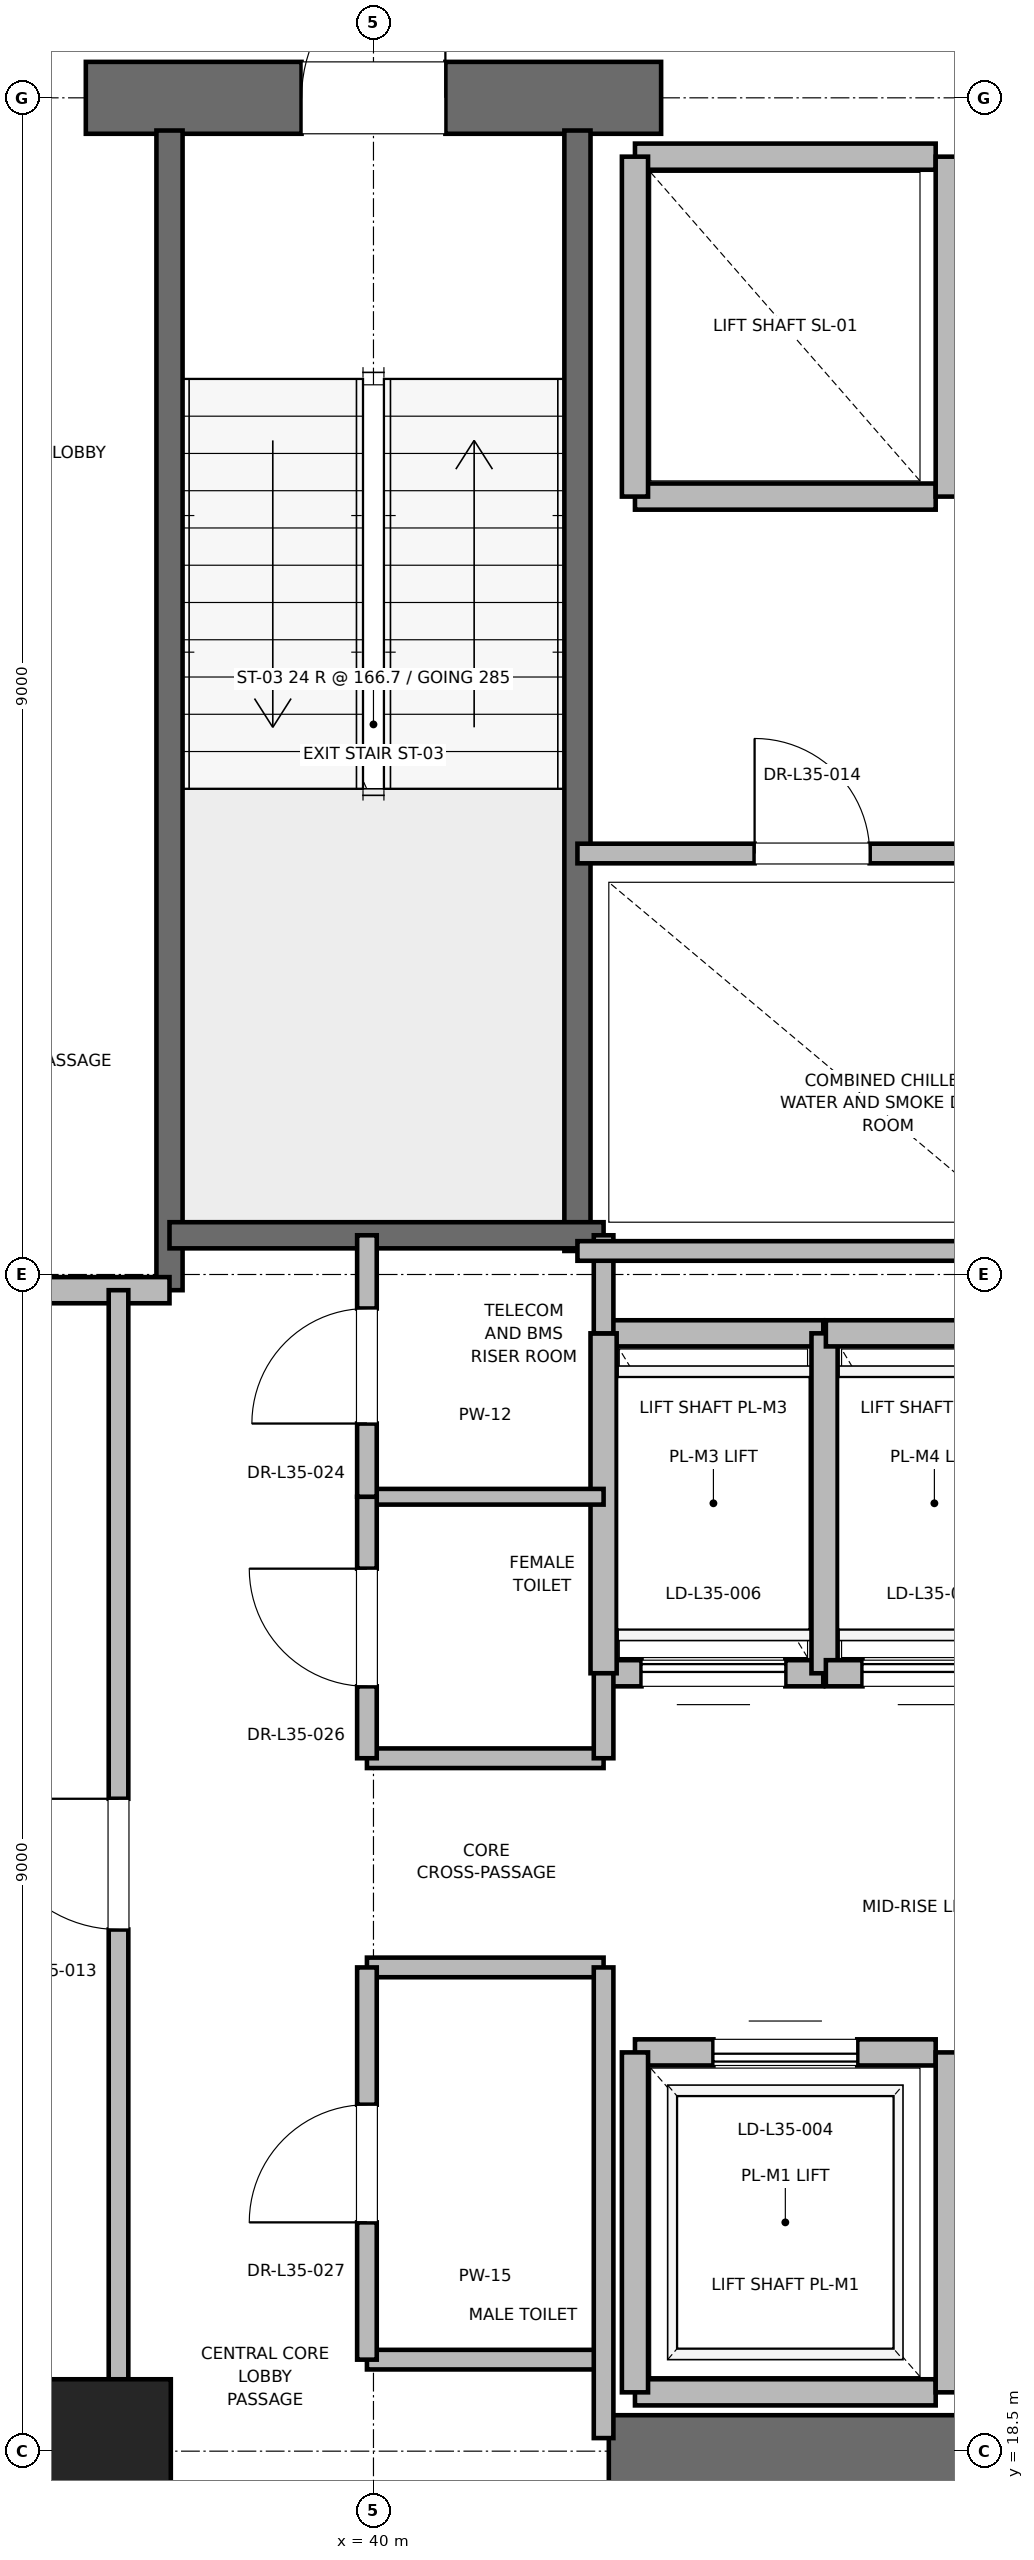
"""IFC4 building model, lengths in metres.
Left out: names, types, materials, properties, quantities, classifications, styles, units other than length and angle.
Written with IfcOpenShell. Run it as: python <this file> out.ifc"""

import sys

from ifc_helpers import new_model, si_unit, direction, frame, frame_2d, origin, origin_2d, place, context, subcontext, project, spatial, rectangle, extrude, element, fill, save


model = new_model("IFC4")
c1 = context("Model", 3, precision=1e-05, world=origin(), true_north=direction((0.0, 1.0)))
c2 = subcontext(c1, "Body", "Model", "MODEL_VIEW")
j1 = project(units=[si_unit("LENGTHUNIT", "METRE"), si_unit("PLANEANGLEUNIT", "RADIAN")], contexts=[c1])
p1 = place(None, origin())
s1 = spatial("IfcSite", under=j1, at=p1, CompositionType="ELEMENT")
p2 = place(p1, origin())
s2 = spatial("IfcBuilding", under=s1, at=p2, CompositionType="ELEMENT")
p3 = place(p2, frame((0.0, 0.0, 152.4)))
s3 = spatial("IfcBuildingStorey", under=s2, at=p3, CompositionType="ELEMENT", Elevation=152.4)
p4 = place(p3, frame((37.9, 18.5, 0.0), z_axis=(0.0, 0.0, 1.0), x_axis=(1.0, 0.0, 0.0)))
e1 = element("IfcColumn", 1, at=p4, inside=s3, PredefinedType="PILASTER", context=c2, shape_type="SweptSolid", body=[
    extrude(rectangle(XDim=1.1, YDim=1.1, at=origin_2d()), origin(), (0.0, 0.0, 1.0), 4.0),
])
for number, where, z_axis, x_axis in (
    (2, (29.0, 18.5, 0.0), (0.0, 0.0, 1.0), (1.0, 0.0, 0.0)),
    (3, (41.8, 18.5, 0.0), (0.0, 0.0, 1.0), (1.0, 0.0, 0.0)),
):
    element("IfcWall", number, at=place(p3, frame(where, z_axis=z_axis, x_axis=x_axis)), inside=s3, PredefinedType="SHEAR", context=c2, shape_type="SweptSolid", body=[
        extrude(rectangle(XDim=9.2, YDim=0.55, at=frame_2d((4.6, 0.0))), origin(), (0.0, 0.0, 1.0), 3.775),
    ])
p5 = place(p3, frame((37.8, 36.5, 0.0), z_axis=(0.0, 0.0, 1.0), x_axis=(1.0, 0.0, 0.0)))
e4 = element("IfcWall", 4, at=p5, inside=s3, PredefinedType="SHEAR", context=c2, shape_type="SweptSolid", body=[
    extrude(rectangle(XDim=4.4, YDim=0.55, at=frame_2d((2.2, 0.0))), origin(), (0.0, 0.0, 1.0), 3.775),
])
p6 = place(p5, frame((1.65, 0.0, 0.0)))
e5 = element("IfcOpeningElement", 5, at=p6, cuts=e4, PredefinedType="OPENING", context=c2, shape_type="SweptSolid", body=[
    extrude(rectangle(XDim=1.1, YDim=2.15, at=frame_2d((0.55, 1.075))), frame((0.0, 0.275, 0.0), z_axis=(0.0, -1.0, 0.0), x_axis=(1.0, 0.0, 0.0)), (0.0, 0.0, 1.0), 0.55),
])
p7 = place(p3, frame((38.44, 27.38, 0.0), z_axis=(0.0, 0.0, 1.0), x_axis=(0.0, 1.0, 0.0)))
e6 = element("IfcWall", 6, at=p7, inside=s3, PredefinedType="SOLIDWALL", context=c2, shape_type="SweptSolid", body=[
    extrude(rectangle(XDim=8.87, YDim=0.2, at=frame_2d((4.435, 0.0))), origin(), (0.0, 0.0, 1.0), 3.775),
])
p8 = place(p3, frame((41.56, 27.68, 0.0), z_axis=(0.0, 0.0, 1.0), x_axis=(0.0, 1.0, 0.0)))
e7 = element("IfcWall", 7, at=p8, inside=s3, PredefinedType="SOLIDWALL", context=c2, shape_type="SweptSolid", body=[
    extrude(rectangle(XDim=8.57, YDim=0.2, at=frame_2d((4.285, 0.0))), origin(), (0.0, 0.0, 1.0), 3.775),
])
p9 = place(p3, frame((38.44, 27.8, 0.0), z_axis=(0.0, 0.0, 1.0), x_axis=(1.0, 0.0, 0.0)))
e8 = element("IfcWall", 8, at=p9, inside=s3, PredefinedType="SOLIDWALL", context=c2, shape_type="SweptSolid", body=[
    extrude(rectangle(XDim=3.32, YDim=0.2, at=frame_2d((1.66, 0.0))), origin(), (0.0, 0.0, 1.0), 3.775),
])
p10 = place(p3, frame((32.82, 27.38, 0.0), z_axis=(0.0, 0.0, 1.0), x_axis=(1.0, 0.0, 0.0)))
e9 = element("IfcWall", 9, at=p10, inside=s3, PredefinedType="PARTITIONING", context=c2, shape_type="SweptSolid", body=[
    extrude(rectangle(XDim=5.62, YDim=0.2, at=frame_2d((2.81, 0.0))), origin(), (0.0, 0.0, 1.0), 3.775),
])
p11 = place(p3, frame((42.0, 18.95, 0.0), z_axis=(0.0, 0.0, 1.0), x_axis=(1.0, 0.0, 0.0)))
e10 = element("IfcWall", 10, at=p11, inside=s3, PredefinedType="SOLIDWALL", context=c2, shape_type="SweptSolid", body=[
    extrude(rectangle(XDim=2.3, YDim=0.2, at=frame_2d((1.15, 0.0))), origin(), (0.0, 0.0, 1.0), 2.755),
])
p12 = place(p3, frame((44.3, 21.55, 0.0), z_axis=(0.0, 0.0, 1.0), x_axis=(-1.0, 0.0, 0.0)))
e11 = element("IfcWall", 11, at=p12, inside=s3, PredefinedType="SOLIDWALL", context=c2, shape_type="SweptSolid", body=[
    extrude(rectangle(XDim=2.3, YDim=0.2, at=frame_2d((1.15, 0.0))), origin(), (0.0, 0.0, 1.0), 3.775),
])
p13 = place(p12, frame((0.6, 0.0, 0.0)))
e12 = element("IfcOpeningElement", 12, at=p13, cuts=e11, PredefinedType="OPENING", context=c2, shape_type="SweptSolid", body=[
    extrude(rectangle(XDim=1.1, YDim=2.2, at=frame_2d((0.55, 1.1))), frame((0.0, 0.1, 0.0), z_axis=(0.0, -1.0, 0.0), x_axis=(1.0, 0.0, 0.0)), (0.0, 0.0, 1.0), 0.2),
])
p14 = place(p3, frame((42.0, 21.55, 0.0), z_axis=(0.0, 0.0, 1.0), x_axis=(0.0, -1.0, 0.0)))
e13 = element("IfcWall", 13, at=p14, inside=s3, PredefinedType="SOLIDWALL", context=c2, shape_type="SweptSolid", body=[
    extrude(rectangle(XDim=2.6, YDim=0.2, at=frame_2d((1.3, 0.0))), origin(), (0.0, 0.0, 1.0), 2.755),
])
p15 = place(p3, frame((44.4, 18.95, 0.0), z_axis=(0.0, 0.0, 1.0), x_axis=(0.0, 1.0, 0.0)))
e14 = element("IfcWall", 14, at=p15, inside=s3, PredefinedType="SOLIDWALL", context=c2, shape_type="SweptSolid", body=[
    extrude(rectangle(XDim=2.6, YDim=0.2, at=frame_2d((1.3, 0.0))), origin(), (0.0, 0.0, 1.0), 3.775),
])
p16 = place(p3, frame((41.76, 24.45, 0.0), z_axis=(0.0, 0.0, 1.0), x_axis=(1.0, 0.0, 0.0)))
e15 = element("IfcWall", 15, at=p16, inside=s3, PredefinedType="SOLIDWALL", context=c2, shape_type="SweptSolid", body=[
    extrude(rectangle(XDim=1.68, YDim=0.2, at=frame_2d((0.84, 0.0))), origin(), (0.0, 0.0, 1.0), 3.775),
])
p17 = place(p16, frame((0.29, 0.0, 0.0)))
e16 = element("IfcOpeningElement", 16, at=p17, cuts=e15, PredefinedType="OPENING", context=c2, shape_type="SweptSolid", body=[
    extrude(rectangle(XDim=1.1, YDim=2.2, at=frame_2d((0.55, 1.1))), frame((0.0, 0.1, 0.0), z_axis=(0.0, -1.0, 0.0), x_axis=(1.0, 0.0, 0.0)), (0.0, 0.0, 1.0), 0.2),
])
p18 = place(p3, frame((43.44, 27.05, 0.0), z_axis=(0.0, 0.0, 1.0), x_axis=(-1.0, 0.0, 0.0)))
e17 = element("IfcWall", 17, at=p18, inside=s3, PredefinedType="SOLIDWALL", context=c2, shape_type="SweptSolid", body=[
    extrude(rectangle(XDim=1.68, YDim=0.2, at=frame_2d((0.84, 0.0))), origin(), (0.0, 0.0, 1.0), 3.775),
])
for number, where, z_axis, x_axis in (
    (18, (41.76, 27.05, 0.0), (0.0, 0.0, 1.0), (0.0, -1.0, 0.0)),
    (19, (43.45, 24.45, 0.0), (0.0, 0.0, 1.0), (0.0, 1.0, 0.0)),
):
    element("IfcWall", number, at=place(p3, frame(where, z_axis=z_axis, x_axis=x_axis)), inside=s3, PredefinedType="SOLIDWALL", context=c2, shape_type="SweptSolid", body=[
        extrude(rectangle(XDim=2.6, YDim=0.2, at=frame_2d((1.3, 0.0))), origin(), (0.0, 0.0, 1.0), 3.775),
    ])
p19 = place(p3, frame((43.46, 24.45, 0.0), z_axis=(0.0, 0.0, 1.0), x_axis=(1.0, 0.0, 0.0)))
e20 = element("IfcWall", 20, at=p19, inside=s3, PredefinedType="SOLIDWALL", context=c2, shape_type="SweptSolid", body=[
    extrude(rectangle(XDim=1.66, YDim=0.2, at=frame_2d((0.83, 0.0))), origin(), (0.0, 0.0, 1.0), 3.775),
])
p20 = place(p19, frame((0.28, 0.0, 0.0)))
e21 = element("IfcOpeningElement", 21, at=p20, cuts=e20, PredefinedType="OPENING", context=c2, shape_type="SweptSolid", body=[
    extrude(rectangle(XDim=1.1, YDim=2.2, at=frame_2d((0.55, 1.1))), frame((0.0, 0.1, 0.0), z_axis=(0.0, -1.0, 0.0), x_axis=(1.0, 0.0, 0.0)), (0.0, 0.0, 1.0), 0.2),
])
p21 = place(p3, frame((45.12, 27.05, 0.0), z_axis=(0.0, 0.0, 1.0), x_axis=(-1.0, 0.0, 0.0)))
e22 = element("IfcWall", 22, at=p21, inside=s3, PredefinedType="SOLIDWALL", context=c2, shape_type="SweptSolid", body=[
    extrude(rectangle(XDim=1.66, YDim=0.2, at=frame_2d((0.83, 0.0))), origin(), (0.0, 0.0, 1.0), 3.775),
])
p22 = place(p3, frame((42.0, 33.45, 0.0), z_axis=(0.0, 0.0, 1.0), x_axis=(1.0, 0.0, 0.0)))
e23 = element("IfcWall", 23, at=p22, inside=s3, PredefinedType="SOLIDWALL", context=c2, shape_type="SweptSolid", body=[
    extrude(rectangle(XDim=2.3, YDim=0.2, at=frame_2d((1.15, 0.0))), origin(), (0.0, 0.0, 1.0), 3.775),
])
p23 = place(p3, frame((44.3, 36.05, 0.0), z_axis=(0.0, 0.0, 1.0), x_axis=(-1.0, 0.0, 0.0)))
e24 = element("IfcWall", 24, at=p23, inside=s3, PredefinedType="SOLIDWALL", context=c2, shape_type="SweptSolid", body=[
    extrude(rectangle(XDim=2.3, YDim=0.2, at=frame_2d((1.15, 0.0))), origin(), (0.0, 0.0, 1.0), 2.755),
])
for number, where, z_axis, x_axis in (
    (25, (42.0, 36.05, 0.0), (0.0, 0.0, 1.0), (0.0, -1.0, 0.0)),
    (26, (44.4, 33.45, 0.0), (0.0, 0.0, 1.0), (0.0, 1.0, 0.0)),
):
    element("IfcWall", number, at=place(p3, frame(where, z_axis=z_axis, x_axis=x_axis)), inside=s3, PredefinedType="SOLIDWALL", context=c2, shape_type="SweptSolid", body=[
        extrude(rectangle(XDim=2.6, YDim=0.2, at=frame_2d((1.3, 0.0))), origin(), (0.0, 0.0, 1.0), 2.755),
    ])
for number, where, z_axis, x_axis in (
    (27, (39.95, 19.2, 0.0), (0.0, 0.0, 1.0), (1.0, 0.0, 0.0)),
    (28, (39.95, 22.2, 0.0), (0.0, 0.0, 1.0), (1.0, 0.0, 0.0)),
    (29, (39.95, 23.8, 0.0), (0.0, 0.0, 1.0), (1.0, 0.0, 0.0)),
):
    element("IfcWall", number, at=place(p3, frame(where, z_axis=z_axis, x_axis=x_axis)), inside=s3, PredefinedType="PARTITIONING", context=c2, shape_type="SweptSolid", body=[
        extrude(rectangle(XDim=1.81, YDim=0.15, at=frame_2d((0.905, 0.0))), origin(), (0.0, 0.0, 1.0), 2.85),
    ])
p24 = place(p3, frame((39.95, 25.8, 0.0), z_axis=(0.0, 0.0, 1.0), x_axis=(1.0, 0.0, 0.0)))
e30 = element("IfcWall", 30, at=p24, inside=s3, PredefinedType="PARTITIONING", context=c2, shape_type="SweptSolid", body=[
    extrude(rectangle(XDim=1.81, YDim=0.12, at=frame_2d((0.905, 0.0))), origin(), (0.0, 0.0, 1.0), 2.85),
])
p25 = place(p3, frame((41.76, 18.6, 0.0), z_axis=(0.0, 0.0, 1.0), x_axis=(0.0, 1.0, 0.0)))
e31 = element("IfcWall", 31, at=p25, inside=s3, PredefinedType="PARTITIONING", context=c2, shape_type="SweptSolid", body=[
    extrude(rectangle(XDim=3.6, YDim=0.15, at=frame_2d((1.8, 0.0))), origin(), (0.0, 0.0, 1.0), 2.755),
])
p26 = place(p3, frame((41.76, 23.8, 0.0), z_axis=(0.0, 0.0, 1.0), x_axis=(0.0, 1.0, 0.0)))
e32 = element("IfcWall", 32, at=p26, inside=s3, PredefinedType="PARTITIONING", context=c2, shape_type="SweptSolid", body=[
    extrude(rectangle(XDim=0.65, YDim=0.15, at=frame_2d((0.325, 0.0))), origin(), (0.0, 0.0, 1.0), 2.85),
])
p27 = place(p3, frame((41.76, 27.05, 0.0), z_axis=(0.0, 0.0, 1.0), x_axis=(0.0, 1.0, 0.0)))
e33 = element("IfcWall", 33, at=p27, inside=s3, PredefinedType="PARTITIONING", context=c2, shape_type="SweptSolid", body=[
    extrude(rectangle(XDim=0.75, YDim=0.15, at=frame_2d((0.375, 0.0))), origin(), (0.0, 0.0, 1.0), 2.85),
])
p28 = place(p3, frame((39.95, 19.2, 0.0), z_axis=(0.0, 0.0, 1.0), x_axis=(0.0, 1.0, 0.0)))
e34 = element("IfcWall", 34, at=p28, inside=s3, PredefinedType="PARTITIONING", context=c2, shape_type="SweptSolid", body=[
    extrude(rectangle(XDim=3.0, YDim=0.15, at=frame_2d((1.5, 0.0))), origin(), (0.0, 0.0, 1.0), 2.85),
])
p29 = place(p28, frame((1.05, 0.0, 0.0)))
e35 = element("IfcOpeningElement", 35, at=p29, cuts=e34, PredefinedType="OPENING", context=c2, shape_type="SweptSolid", body=[
    extrude(rectangle(XDim=0.9, YDim=2.1, at=frame_2d((0.45, 1.05))), frame((0.0, 0.075, 0.0), z_axis=(0.0, -1.0, 0.0), x_axis=(1.0, 0.0, 0.0)), (0.0, 0.0, 1.0), 0.15),
])
p30 = place(p3, frame((39.95, 23.8, 0.0), z_axis=(0.0, 0.0, 1.0), x_axis=(0.0, 1.0, 0.0)))
e36 = element("IfcWall", 36, at=p30, inside=s3, PredefinedType="PARTITIONING", context=c2, shape_type="SweptSolid", body=[
    extrude(rectangle(XDim=2.0, YDim=0.15, at=frame_2d((1.0, 0.0))), origin(), (0.0, 0.0, 1.0), 2.85),
])
p31 = place(p30, frame((0.55, 0.0, 0.0)))
e37 = element("IfcOpeningElement", 37, at=p31, cuts=e36, PredefinedType="OPENING", context=c2, shape_type="SweptSolid", body=[
    extrude(rectangle(XDim=0.9, YDim=2.1, at=frame_2d((0.45, 1.05))), frame((0.0, 0.075, 0.0), z_axis=(0.0, -1.0, 0.0), x_axis=(1.0, 0.0, 0.0)), (0.0, 0.0, 1.0), 0.15),
])
p32 = place(p3, frame((39.95, 25.8, 0.0), z_axis=(0.0, 0.0, 1.0), x_axis=(0.0, 1.0, 0.0)))
e38 = element("IfcWall", 38, at=p32, inside=s3, PredefinedType="PARTITIONING", context=c2, shape_type="SweptSolid", body=[
    extrude(rectangle(XDim=2.0, YDim=0.15, at=frame_2d((1.0, 0.0))), origin(), (0.0, 0.0, 1.0), 2.85),
])
p33 = place(p32, frame((0.56, 0.0, 0.0)))
e39 = element("IfcOpeningElement", 39, at=p33, cuts=e38, PredefinedType="OPENING", context=c2, shape_type="SweptSolid", body=[
    extrude(rectangle(XDim=0.88, YDim=2.1, at=frame_2d((0.44, 1.05))), frame((0.0, 0.075, 0.0), z_axis=(0.0, -1.0, 0.0), x_axis=(1.0, 0.0, 0.0)), (0.0, 0.0, 1.0), 0.15),
])
p34 = place(p3, frame((38.05, 18.6, 0.0), z_axis=(0.0, 0.0, 1.0), x_axis=(0.0, 1.0, 0.0)))
e40 = element("IfcWall", 40, at=p34, inside=s3, PredefinedType="PARTITIONING", context=c2, shape_type="SweptSolid", body=[
    extrude(rectangle(XDim=8.78, YDim=0.15, at=frame_2d((4.39, 0.0))), origin(), (0.0, 0.0, 1.0), 2.755),
])
p35 = place(p34, frame((3.89, 0.0, 0.0)))
e41 = element("IfcOpeningElement", 41, at=p35, cuts=e40, PredefinedType="OPENING", context=c2, shape_type="SweptSolid", body=[
    extrude(rectangle(XDim=1.0, YDim=2.15, at=frame_2d((0.5, 1.075))), frame((0.0, 0.075, 0.0), z_axis=(0.0, -1.0, 0.0), x_axis=(1.0, 0.0, 0.0)), (0.0, 0.0, 1.0), 0.15),
])
p36 = place(p3, frame((41.56, 27.68, 0.0), z_axis=(0.0, 0.0, 1.0), x_axis=(1.0, 0.0, 0.0)))
e42 = element("IfcWall", 42, at=p36, inside=s3, PredefinedType="PARTITIONING", context=c2, shape_type="SweptSolid", body=[
    extrude(rectangle(XDim=3.59, YDim=0.15, at=frame_2d((1.795, 0.0))), origin(), (0.0, 0.0, 1.0), 2.85),
])
p37 = place(p3, frame((41.56, 30.72, 0.0), z_axis=(0.0, 0.0, 1.0), x_axis=(1.0, 0.0, 0.0)))
e43 = element("IfcWall", 43, at=p37, inside=s3, PredefinedType="PARTITIONING", context=c2, shape_type="SweptSolid", body=[
    extrude(rectangle(XDim=3.59, YDim=0.15, at=frame_2d((1.795, 0.0))), origin(), (0.0, 0.0, 1.0), 2.85),
])
p38 = place(p37, frame((1.355, 0.0, 0.0)))
e44 = element("IfcOpeningElement", 44, at=p38, cuts=e43, PredefinedType="OPENING", context=c2, shape_type="SweptSolid", body=[
    extrude(rectangle(XDim=0.88, YDim=2.1, at=frame_2d((0.44, 1.05))), frame((0.0, 0.075, 0.0), z_axis=(0.0, -1.0, 0.0), x_axis=(1.0, 0.0, 0.0)), (0.0, 0.0, 1.0), 0.15),
])
p39 = place(p6, origin())
e45 = element("IfcDoor", 45, at=p39, inside=s3, OperationType="SINGLE_SWING_RIGHT", PredefinedType="DOOR", context=c2, shape_type="SweptSolid", body=[
    extrude(rectangle(XDim=1.1, YDim=2.15, at=frame_2d((0.55, 1.075))), frame((0.0, 0.025, 0.0), z_axis=(0.0, -1.0, 0.0), x_axis=(1.0, 0.0, 0.0)), (0.0, 0.0, 1.0), 0.05),
])
fill(e5, e45)
p40 = place(p13, origin())
e46 = element("IfcDoor", 46, at=p40, inside=s3, OperationType="SLIDING_TO_RIGHT", PredefinedType="DOOR", context=c2, shape_type="SweptSolid", body=[
    extrude(rectangle(XDim=1.1, YDim=2.2, at=frame_2d((0.55, 1.1))), frame((0.0, 0.025, 0.0), z_axis=(0.0, -1.0, 0.0), x_axis=(1.0, 0.0, 0.0)), (0.0, 0.0, 1.0), 0.05),
])
fill(e12, e46)
p41 = place(p17, origin())
e47 = element("IfcDoor", 47, at=p41, inside=s3, OperationType="SLIDING_TO_RIGHT", PredefinedType="DOOR", context=c2, shape_type="SweptSolid", body=[
    extrude(rectangle(XDim=1.1, YDim=2.2, at=frame_2d((0.55, 1.1))), frame((0.0, 0.025, 0.0), z_axis=(0.0, -1.0, 0.0), x_axis=(1.0, 0.0, 0.0)), (0.0, 0.0, 1.0), 0.05),
])
fill(e16, e47)
p42 = place(p20, origin())
e48 = element("IfcDoor", 48, at=p42, inside=s3, OperationType="SLIDING_TO_RIGHT", PredefinedType="DOOR", context=c2, shape_type="SweptSolid", body=[
    extrude(rectangle(XDim=1.1, YDim=2.2, at=frame_2d((0.55, 1.1))), frame((0.0, 0.025, 0.0), z_axis=(0.0, -1.0, 0.0), x_axis=(1.0, 0.0, 0.0)), (0.0, 0.0, 1.0), 0.05),
])
fill(e21, e48)
p43 = place(p29, origin())
e49 = element("IfcDoor", 49, at=p43, inside=s3, OperationType="SINGLE_SWING_LEFT", PredefinedType="DOOR", context=c2, shape_type="SweptSolid", body=[
    extrude(rectangle(XDim=0.9, YDim=2.1, at=frame_2d((0.45, 1.05))), frame((0.0, 0.025, 0.0), z_axis=(0.0, -1.0, 0.0), x_axis=(1.0, 0.0, 0.0)), (0.0, 0.0, 1.0), 0.05),
])
fill(e35, e49)
p44 = place(p31, origin())
e50 = element("IfcDoor", 50, at=p44, inside=s3, OperationType="SINGLE_SWING_RIGHT", PredefinedType="DOOR", context=c2, shape_type="SweptSolid", body=[
    extrude(rectangle(XDim=0.9, YDim=2.1, at=frame_2d((0.45, 1.05))), frame((0.0, 0.025, 0.0), z_axis=(0.0, -1.0, 0.0), x_axis=(1.0, 0.0, 0.0)), (0.0, 0.0, 1.0), 0.05),
])
fill(e37, e50)
p45 = place(p33, origin())
e51 = element("IfcDoor", 51, at=p45, inside=s3, OperationType="SINGLE_SWING_LEFT", PredefinedType="DOOR", context=c2, shape_type="SweptSolid", body=[
    extrude(rectangle(XDim=0.88, YDim=2.1, at=frame_2d((0.44, 1.05))), frame((0.0, 0.025, 0.0), z_axis=(0.0, -1.0, 0.0), x_axis=(1.0, 0.0, 0.0)), (0.0, 0.0, 1.0), 0.05),
])
fill(e39, e51)
p46 = place(p35, origin())
e52 = element("IfcDoor", 52, at=p46, inside=s3, OperationType="SINGLE_SWING_RIGHT", PredefinedType="DOOR", context=c2, shape_type="SweptSolid", body=[
    extrude(rectangle(XDim=1.0, YDim=2.15, at=frame_2d((0.5, 1.075))), frame((0.0, 0.025, 0.0), z_axis=(0.0, -1.0, 0.0), x_axis=(1.0, 0.0, 0.0)), (0.0, 0.0, 1.0), 0.05),
])
fill(e41, e52)
p47 = place(p38, origin())
e53 = element("IfcDoor", 53, at=p47, inside=s3, OperationType="SINGLE_SWING_LEFT", PredefinedType="DOOR", context=c2, shape_type="SweptSolid", body=[
    extrude(rectangle(XDim=0.88, YDim=2.1, at=frame_2d((0.44, 1.05))), frame((0.0, 0.025, 0.0), z_axis=(0.0, -1.0, 0.0), x_axis=(1.0, 0.0, 0.0)), (0.0, 0.0, 1.0), 0.05),
])
fill(e44, e53)
save(model, sys.argv[1])
